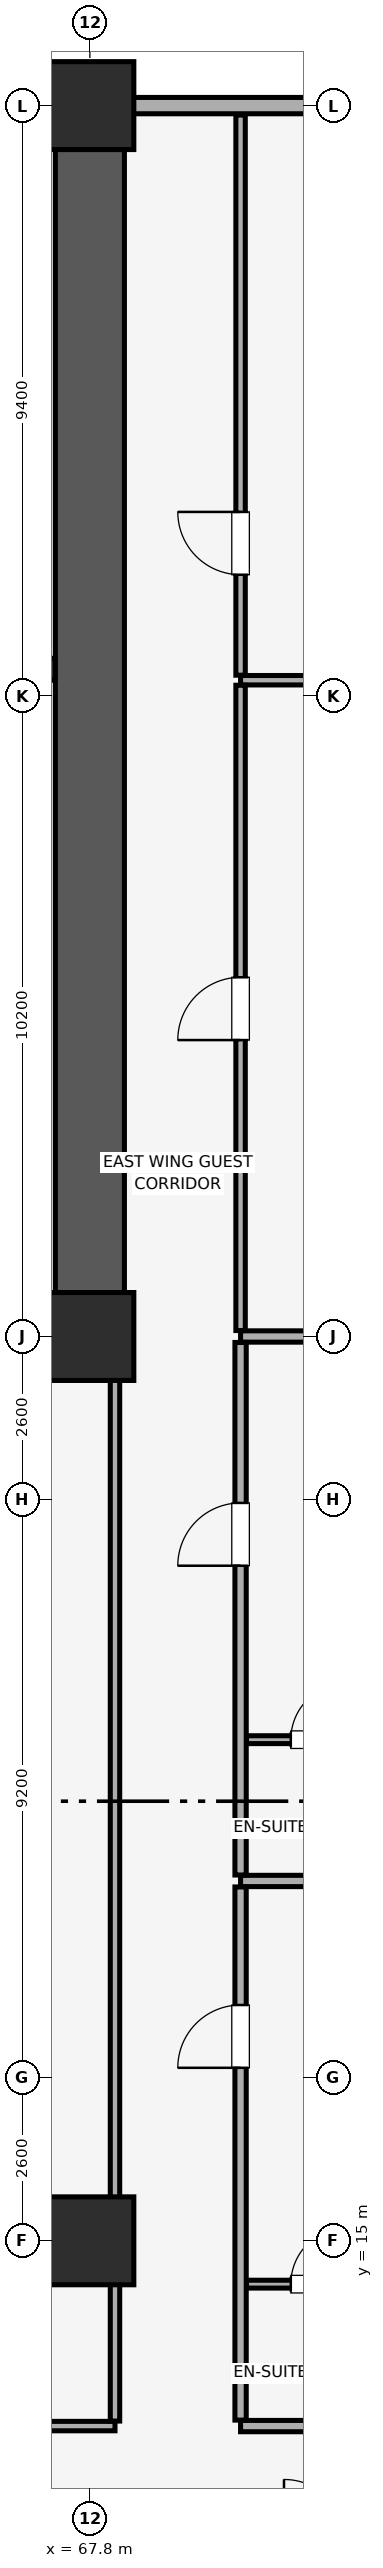
"""IFC4 building model, lengths in metres.
Left out: names, types, materials, properties, quantities, classifications, styles, units other than length and angle.
Written with IfcOpenShell. Run it as: python <this file> out.ifc"""

import sys

from ifc_helpers import new_model, si_unit, direction, frame, frame_2d, origin, origin_2d, place, context, subcontext, project, spatial, rectangle, extrude, element, fill, save


model = new_model("IFC4")
c1 = context("Model", 3, precision=1e-05, world=origin(), true_north=direction((0.0, 1.0)))
c2 = subcontext(c1, "Body", "Model", "MODEL_VIEW")
j1 = project(units=[si_unit("LENGTHUNIT", "METRE"), si_unit("PLANEANGLEUNIT", "RADIAN")], contexts=[c1])
p1 = place(None, origin())
s1 = spatial("IfcSite", under=j1, at=p1, CompositionType="ELEMENT")
p2 = place(p1, origin())
s2 = spatial("IfcBuilding", under=s1, at=p2, CompositionType="ELEMENT")
p3 = place(p2, frame((0.0, 0.0, 46.4)))
s3 = spatial("IfcBuildingStorey", under=s2, at=p3, CompositionType="ELEMENT", Elevation=46.4)
for number, where, z_axis, x_axis in (
    (1, (67.8, 15.0, 0.0), (0.0, 0.0, 1.0), (1.0, 0.0, 0.0)),
    (2, (67.8, 29.4, 0.0), (0.0, 0.0, 1.0), (1.0, 0.0, 0.0)),
    (3, (67.8, 49.0, 0.0), (0.0, 0.0, 1.0), (1.0, 0.0, 0.0)),
):
    element("IfcColumn", number, at=place(p3, frame(where, z_axis=z_axis, x_axis=x_axis)), inside=s3, PredefinedType="COLUMN", context=c2, shape_type="SweptSolid", body=[
        extrude(rectangle(XDim=1.4, YDim=1.4, at=origin_2d()), origin(), (0.0, 0.0, 1.0), 3.51),
    ])
p4 = place(p3, frame((79.8, 49.0, 0.0), z_axis=(0.0, 0.0, 1.0), x_axis=(-1.0, 0.0, 0.0)))
e4 = element("IfcWall", 4, at=p4, inside=s3, PredefinedType="SOLIDWALL", context=c2, shape_type="SweptSolid", body=[
    extrude(rectangle(XDim=75.6, YDim=0.26, at=frame_2d((37.8, 0.0))), origin(), (0.0, 0.0, 1.0), 2.56),
])
p5 = place(p4, frame((72.565, 0.0, 0.85)))
e5 = element("IfcOpeningElement", 5, at=p5, cuts=e4, PredefinedType="OPENING", context=c2, shape_type="SweptSolid", body=[
    extrude(rectangle(XDim=1.5, YDim=1.4, at=frame_2d((0.75, 0.7))), frame((0.0, 0.14, 0.0), z_axis=(0.0, -1.0, 0.0), x_axis=(1.0, 0.0, 0.0)), (0.0, 0.0, 1.0), 0.28),
])
p6 = place(p4, frame((67.45, 0.0, 0.85)))
e6 = element("IfcOpeningElement", 6, at=p6, cuts=e4, PredefinedType="OPENING", context=c2, shape_type="SweptSolid", body=[
    extrude(rectangle(XDim=1.5, YDim=1.4, at=frame_2d((0.75, 0.7))), frame((0.0, 0.14, 0.0), z_axis=(0.0, -1.0, 0.0), x_axis=(1.0, 0.0, 0.0)), (0.0, 0.0, 1.0), 0.28),
])
p7 = place(p4, frame((6.65, 0.0, 0.85)))
e7 = element("IfcOpeningElement", 7, at=p7, cuts=e4, PredefinedType="OPENING", context=c2, shape_type="SweptSolid", body=[
    extrude(rectangle(XDim=1.5, YDim=1.4, at=frame_2d((0.75, 0.7))), frame((0.0, 0.14, 0.0), z_axis=(0.0, -1.0, 0.0), x_axis=(1.0, 0.0, 0.0)), (0.0, 0.0, 1.0), 0.28),
])
p8 = place(p4, frame((1.535, 0.0, 0.85)))
e8 = element("IfcOpeningElement", 8, at=p8, cuts=e4, PredefinedType="OPENING", context=c2, shape_type="SweptSolid", body=[
    extrude(rectangle(XDim=1.5, YDim=1.4, at=frame_2d((0.75, 0.7))), frame((0.0, 0.14, 0.0), z_axis=(0.0, -1.0, 0.0), x_axis=(1.0, 0.0, 0.0)), (0.0, 0.0, 1.0), 0.28),
])
p9 = place(p4, frame((51.365, 0.0, 0.9)))
e9 = element("IfcOpeningElement", 9, at=p9, cuts=e4, PredefinedType="OPENING", context=c2, shape_type="SweptSolid", body=[
    extrude(rectangle(XDim=1.5, YDim=1.4, at=frame_2d((0.75, 0.7))), frame((0.0, 0.14, 0.0), z_axis=(0.0, -1.0, 0.0), x_axis=(1.0, 0.0, 0.0)), (0.0, 0.0, 1.0), 0.28),
])
p10 = place(p4, frame((44.55, 0.0, 0.9)))
e10 = element("IfcOpeningElement", 10, at=p10, cuts=e4, PredefinedType="OPENING", context=c2, shape_type="SweptSolid", body=[
    extrude(rectangle(XDim=1.5, YDim=1.4, at=frame_2d((0.75, 0.7))), frame((0.0, 0.14, 0.0), z_axis=(0.0, -1.0, 0.0), x_axis=(1.0, 0.0, 0.0)), (0.0, 0.0, 1.0), 0.28),
])
p11 = place(p4, frame((28.1, 0.0, 0.9)))
e11 = element("IfcOpeningElement", 11, at=p11, cuts=e4, PredefinedType="OPENING", context=c2, shape_type="SweptSolid", body=[
    extrude(rectangle(XDim=1.5, YDim=1.4, at=frame_2d((0.75, 0.7))), frame((0.0, 0.14, 0.0), z_axis=(0.0, -1.0, 0.0), x_axis=(1.0, 0.0, 0.0)), (0.0, 0.0, 1.0), 0.28),
])
p12 = place(p4, frame((23.485, 0.0, 0.9)))
e12 = element("IfcOpeningElement", 12, at=p12, cuts=e4, PredefinedType="OPENING", context=c2, shape_type="SweptSolid", body=[
    extrude(rectangle(XDim=1.5, YDim=1.4, at=frame_2d((0.75, 0.7))), frame((0.0, 0.14, 0.0), z_axis=(0.0, -1.0, 0.0), x_axis=(1.0, 0.0, 0.0)), (0.0, 0.0, 1.0), 0.28),
])
p13 = place(p3, frame((67.8, 29.4, 0.0), z_axis=(0.0, 0.0, 1.0), x_axis=(0.0, 1.0, 0.0)))
e13 = element("IfcWall", 13, at=p13, inside=s3, PredefinedType="SHEAR", context=c2, shape_type="SweptSolid", body=[
    extrude(rectangle(XDim=19.2, YDim=1.1, at=frame_2d((9.6, 0.0))), origin(), (0.0, 0.0, 1.0), 3.51),
])
p14 = place(p3, frame((60.4, 29.4, 0.0), z_axis=(0.0, 0.0, 1.0), x_axis=(1.0, 0.0, 0.0)))
e14 = element("IfcWall", 14, at=p14, inside=s3, PredefinedType="SHEAR", context=c2, shape_type="SweptSolid", body=[
    extrude(rectangle(XDim=6.845, YDim=1.1, at=frame_2d((3.423, 0.0))), origin(), (0.0, 0.0, 1.0), 3.51),
])
p15 = place(p3, frame((63.145, 40.025, 0.0), z_axis=(0.0, 0.0, 1.0), x_axis=(1.0, 0.0, 0.0)))
e15 = element("IfcWall", 15, at=p15, inside=s3, PredefinedType="SHEAR", context=c2, shape_type="SweptSolid", body=[
    extrude(rectangle(XDim=4.1, YDim=0.35, at=frame_2d((2.05, 0.0))), origin(), (0.0, 0.0, 1.0), 3.51),
])
p16 = place(p15, frame((1.24, 0.0, 0.0)))
e16 = element("IfcOpeningElement", 16, at=p16, cuts=e15, PredefinedType="OPENING", context=c2, shape_type="SweptSolid", body=[
    extrude(rectangle(XDim=1.15, YDim=2.15, at=frame_2d((0.575, 1.075))), frame((0.0, 0.185, 0.0), z_axis=(0.0, -1.0, 0.0), x_axis=(1.0, 0.0, 0.0)), (0.0, 0.0, 1.0), 0.37),
])
p17 = place(p3, frame((59.0, 12.05, 0.0), z_axis=(0.0, 0.0, 1.0), x_axis=(1.0, 0.0, 0.0)))
e17 = element("IfcWall", 17, at=p17, inside=s3, PredefinedType="PARTITIONING", context=c2, shape_type="SweptSolid", body=[
    extrude(rectangle(XDim=9.2, YDim=0.15, at=frame_2d((4.6, 0.0))), origin(), (0.0, 0.0, 1.0), 3.51),
])
p18 = place(p17, frame((4.1, 0.0, 0.0)))
e18 = element("IfcOpeningElement", 18, at=p18, cuts=e17, PredefinedType="OPENING", context=c2, shape_type="SweptSolid", body=[
    extrude(rectangle(XDim=1.0, YDim=2.15, at=frame_2d((0.5, 1.075))), frame((0.0, 0.085, 0.0), z_axis=(0.0, -1.0, 0.0), x_axis=(1.0, 0.0, 0.0)), (0.0, 0.0, 1.0), 0.17),
])
p19 = place(p3, frame((68.2, 12.13, 0.0), z_axis=(0.0, 0.0, 1.0), x_axis=(0.0, 1.0, 0.0)))
e19 = element("IfcWall", 19, at=p19, inside=s3, PredefinedType="PARTITIONING", context=c2, shape_type="SweptSolid", body=[
    extrude(rectangle(XDim=17.26, YDim=0.15, at=frame_2d((8.63, 0.0))), origin(), (0.0, 0.0, 1.0), 3.51),
])
for number, where, z_axis, x_axis in (
    (20, (70.2, 12.05, 0.0), (0.0, 0.0, 1.0), (1.0, 0.0, 0.0)),
    (21, (70.2, 20.73, 0.0), (0.0, 0.0, 1.0), (1.0, 0.0, 0.0)),
):
    element("IfcWall", number, at=place(p3, frame(where, z_axis=z_axis, x_axis=x_axis)), inside=s3, PredefinedType="PARTITIONING", context=c2, shape_type="SweptSolid", body=[
        extrude(rectangle(XDim=13.65, YDim=0.18, at=frame_2d((6.825, 0.0))), origin(), (0.0, 0.0, 1.0), 3.51),
    ])
p20 = place(p3, frame((70.2, 12.145, 0.0), z_axis=(0.0, 0.0, 1.0), x_axis=(0.0, 1.0, 0.0)))
e22 = element("IfcWall", 22, at=p20, inside=s3, PredefinedType="PARTITIONING", context=c2, shape_type="SweptSolid", body=[
    extrude(rectangle(XDim=8.49, YDim=0.18, at=frame_2d((4.245, 0.0))), origin(), (0.0, 0.0, 1.0), 3.51),
])
p21 = place(p20, frame((5.61, 0.0, 0.0)))
e23 = element("IfcOpeningElement", 23, at=p21, cuts=e22, PredefinedType="OPENING", context=c2, shape_type="SweptSolid", body=[
    extrude(rectangle(XDim=1.0, YDim=2.15, at=frame_2d((0.5, 1.075))), frame((0.0, 0.1, 0.0), z_axis=(0.0, -1.0, 0.0), x_axis=(1.0, 0.0, 0.0)), (0.0, 0.0, 1.0), 0.2),
])
p22 = place(p3, frame((70.295, 14.31, 0.0), z_axis=(0.0, 0.0, 1.0), x_axis=(1.0, 0.0, 0.0)))
e24 = element("IfcWall", 24, at=p22, inside=s3, PredefinedType="PARTITIONING", context=c2, shape_type="SweptSolid", body=[
    extrude(rectangle(XDim=2.405, YDim=0.125, at=frame_2d((1.203, 0.0))), origin(), (0.0, 0.0, 1.0), 3.51),
])
p23 = place(p22, frame((0.705, 0.0, 0.0)))
e25 = element("IfcOpeningElement", 25, at=p23, cuts=e24, PredefinedType="OPENING", context=c2, shape_type="SweptSolid", body=[
    extrude(rectangle(XDim=0.9, YDim=2.1, at=frame_2d((0.45, 1.05))), frame((0.0, 0.073, 0.0), z_axis=(0.0, -1.0, 0.0), x_axis=(1.0, 0.0, 0.0)), (0.0, 0.0, 1.0), 0.145),
])
p24 = place(p3, frame((70.2, 29.4, 0.0), z_axis=(0.0, 0.0, 1.0), x_axis=(1.0, 0.0, 0.0)))
e26 = element("IfcWall", 26, at=p24, inside=s3, PredefinedType="PARTITIONING", context=c2, shape_type="SweptSolid", body=[
    extrude(rectangle(XDim=13.65, YDim=0.18, at=frame_2d((6.825, 0.0))), origin(), (0.0, 0.0, 1.0), 2.86),
])
p25 = place(p3, frame((70.2, 20.825, 0.0), z_axis=(0.0, 0.0, 1.0), x_axis=(0.0, 1.0, 0.0)))
e27 = element("IfcWall", 27, at=p25, inside=s3, PredefinedType="PARTITIONING", context=c2, shape_type="SweptSolid", body=[
    extrude(rectangle(XDim=8.48, YDim=0.18, at=frame_2d((4.24, 0.0))), origin(), (0.0, 0.0, 1.0), 3.51),
])
p26 = place(p25, frame((4.925, 0.0, 0.0)))
e28 = element("IfcOpeningElement", 28, at=p26, cuts=e27, PredefinedType="OPENING", context=c2, shape_type="SweptSolid", body=[
    extrude(rectangle(XDim=1.0, YDim=2.15, at=frame_2d((0.5, 1.075))), frame((0.0, 0.1, 0.0), z_axis=(0.0, -1.0, 0.0), x_axis=(1.0, 0.0, 0.0)), (0.0, 0.0, 1.0), 0.2),
])
p27 = place(p3, frame((70.295, 22.98, 0.0), z_axis=(0.0, 0.0, 1.0), x_axis=(1.0, 0.0, 0.0)))
e29 = element("IfcWall", 29, at=p27, inside=s3, PredefinedType="PARTITIONING", context=c2, shape_type="SweptSolid", body=[
    extrude(rectangle(XDim=2.405, YDim=0.125, at=frame_2d((1.203, 0.0))), origin(), (0.0, 0.0, 1.0), 3.51),
])
p28 = place(p27, frame((0.705, 0.0, 0.0)))
e30 = element("IfcOpeningElement", 30, at=p28, cuts=e29, PredefinedType="OPENING", context=c2, shape_type="SweptSolid", body=[
    extrude(rectangle(XDim=0.9, YDim=2.1, at=frame_2d((0.45, 1.05))), frame((0.0, 0.073, 0.0), z_axis=(0.0, -1.0, 0.0), x_axis=(1.0, 0.0, 0.0)), (0.0, 0.0, 1.0), 0.145),
])
p29 = place(p3, frame((70.2, 39.85, 0.0), z_axis=(0.0, 0.0, 1.0), x_axis=(1.0, 0.0, 0.0)))
e31 = element("IfcWall", 31, at=p29, inside=s3, PredefinedType="PARTITIONING", context=c2, shape_type="SweptSolid", body=[
    extrude(rectangle(XDim=13.65, YDim=0.15, at=frame_2d((6.825, 0.0))), origin(), (0.0, 0.0, 1.0), 3.51),
])
p30 = place(p3, frame((70.2, 29.495, 0.0), z_axis=(0.0, 0.0, 1.0), x_axis=(0.0, 1.0, 0.0)))
e32 = element("IfcWall", 32, at=p30, inside=s3, PredefinedType="PARTITIONING", context=c2, shape_type="SweptSolid", body=[
    extrude(rectangle(XDim=10.275, YDim=0.15, at=frame_2d((5.137, 0.0))), origin(), (0.0, 0.0, 1.0), 3.51),
])
p31 = place(p30, frame((4.625, 0.0, 0.0)))
e33 = element("IfcOpeningElement", 33, at=p31, cuts=e32, PredefinedType="OPENING", context=c2, shape_type="SweptSolid", body=[
    extrude(rectangle(XDim=1.0, YDim=2.15, at=frame_2d((0.5, 1.075))), frame((0.0, 0.085, 0.0), z_axis=(0.0, -1.0, 0.0), x_axis=(1.0, 0.0, 0.0)), (0.0, 0.0, 1.0), 0.17),
])
p32 = place(p3, frame((70.2, 39.93, 0.0), z_axis=(0.0, 0.0, 1.0), x_axis=(0.0, 1.0, 0.0)))
e34 = element("IfcWall", 34, at=p32, inside=s3, PredefinedType="PARTITIONING", context=c2, shape_type="SweptSolid", body=[
    extrude(rectangle(XDim=8.92, YDim=0.15, at=frame_2d((4.46, 0.0))), origin(), (0.0, 0.0, 1.0), 3.51),
])
p33 = place(p32, frame((1.6, 0.0, 0.0)))
e35 = element("IfcOpeningElement", 35, at=p33, cuts=e34, PredefinedType="OPENING", context=c2, shape_type="SweptSolid", body=[
    extrude(rectangle(XDim=1.0, YDim=2.15, at=frame_2d((0.5, 1.075))), frame((0.0, 0.085, 0.0), z_axis=(0.0, -1.0, 0.0), x_axis=(1.0, 0.0, 0.0)), (0.0, 0.0, 1.0), 0.17),
])
p34 = place(p21, origin())
e36 = element("IfcDoor", 36, at=p34, inside=s3, OperationType="SINGLE_SWING_LEFT", PredefinedType="DOOR", context=c2, shape_type="SweptSolid", body=[
    extrude(rectangle(XDim=1.0, YDim=2.15, at=frame_2d((0.5, 1.075))), frame((0.0, 0.025, 0.0), z_axis=(0.0, -1.0, 0.0), x_axis=(1.0, 0.0, 0.0)), (0.0, 0.0, 1.0), 0.05),
])
fill(e23, e36)
p35 = place(p23, origin())
e37 = element("IfcDoor", 37, at=p35, inside=s3, OperationType="SINGLE_SWING_RIGHT", PredefinedType="DOOR", context=c2, shape_type="SweptSolid", body=[
    extrude(rectangle(XDim=0.9, YDim=2.1, at=frame_2d((0.45, 1.05))), frame((0.0, 0.025, 0.0), z_axis=(0.0, -1.0, 0.0), x_axis=(1.0, 0.0, 0.0)), (0.0, 0.0, 1.0), 0.05),
])
fill(e25, e37)
p36 = place(p26, origin())
e38 = element("IfcDoor", 38, at=p36, inside=s3, OperationType="SINGLE_SWING_LEFT", PredefinedType="DOOR", context=c2, shape_type="SweptSolid", body=[
    extrude(rectangle(XDim=1.0, YDim=2.15, at=frame_2d((0.5, 1.075))), frame((0.0, 0.025, 0.0), z_axis=(0.0, -1.0, 0.0), x_axis=(1.0, 0.0, 0.0)), (0.0, 0.0, 1.0), 0.05),
])
fill(e28, e38)
p37 = place(p28, origin())
e39 = element("IfcDoor", 39, at=p37, inside=s3, OperationType="SINGLE_SWING_RIGHT", PredefinedType="DOOR", context=c2, shape_type="SweptSolid", body=[
    extrude(rectangle(XDim=0.9, YDim=2.1, at=frame_2d((0.45, 1.05))), frame((0.0, 0.025, 0.0), z_axis=(0.0, -1.0, 0.0), x_axis=(1.0, 0.0, 0.0)), (0.0, 0.0, 1.0), 0.05),
])
fill(e30, e39)
p38 = place(p31, origin())
e40 = element("IfcDoor", 40, at=p38, inside=s3, OperationType="SINGLE_SWING_LEFT", PredefinedType="DOOR", context=c2, shape_type="SweptSolid", body=[
    extrude(rectangle(XDim=1.0, YDim=2.15, at=frame_2d((0.5, 1.075))), frame((0.0, 0.025, 0.0), z_axis=(0.0, -1.0, 0.0), x_axis=(1.0, 0.0, 0.0)), (0.0, 0.0, 1.0), 0.05),
])
fill(e33, e40)
p39 = place(p33, origin())
e41 = element("IfcDoor", 41, at=p39, inside=s3, OperationType="SINGLE_SWING_RIGHT", PredefinedType="DOOR", context=c2, shape_type="SweptSolid", body=[
    extrude(rectangle(XDim=1.0, YDim=2.15, at=frame_2d((0.5, 1.075))), frame((0.0, 0.025, 0.0), z_axis=(0.0, -1.0, 0.0), x_axis=(1.0, 0.0, 0.0)), (0.0, 0.0, 1.0), 0.05),
])
fill(e35, e41)
save(model, sys.argv[1])
